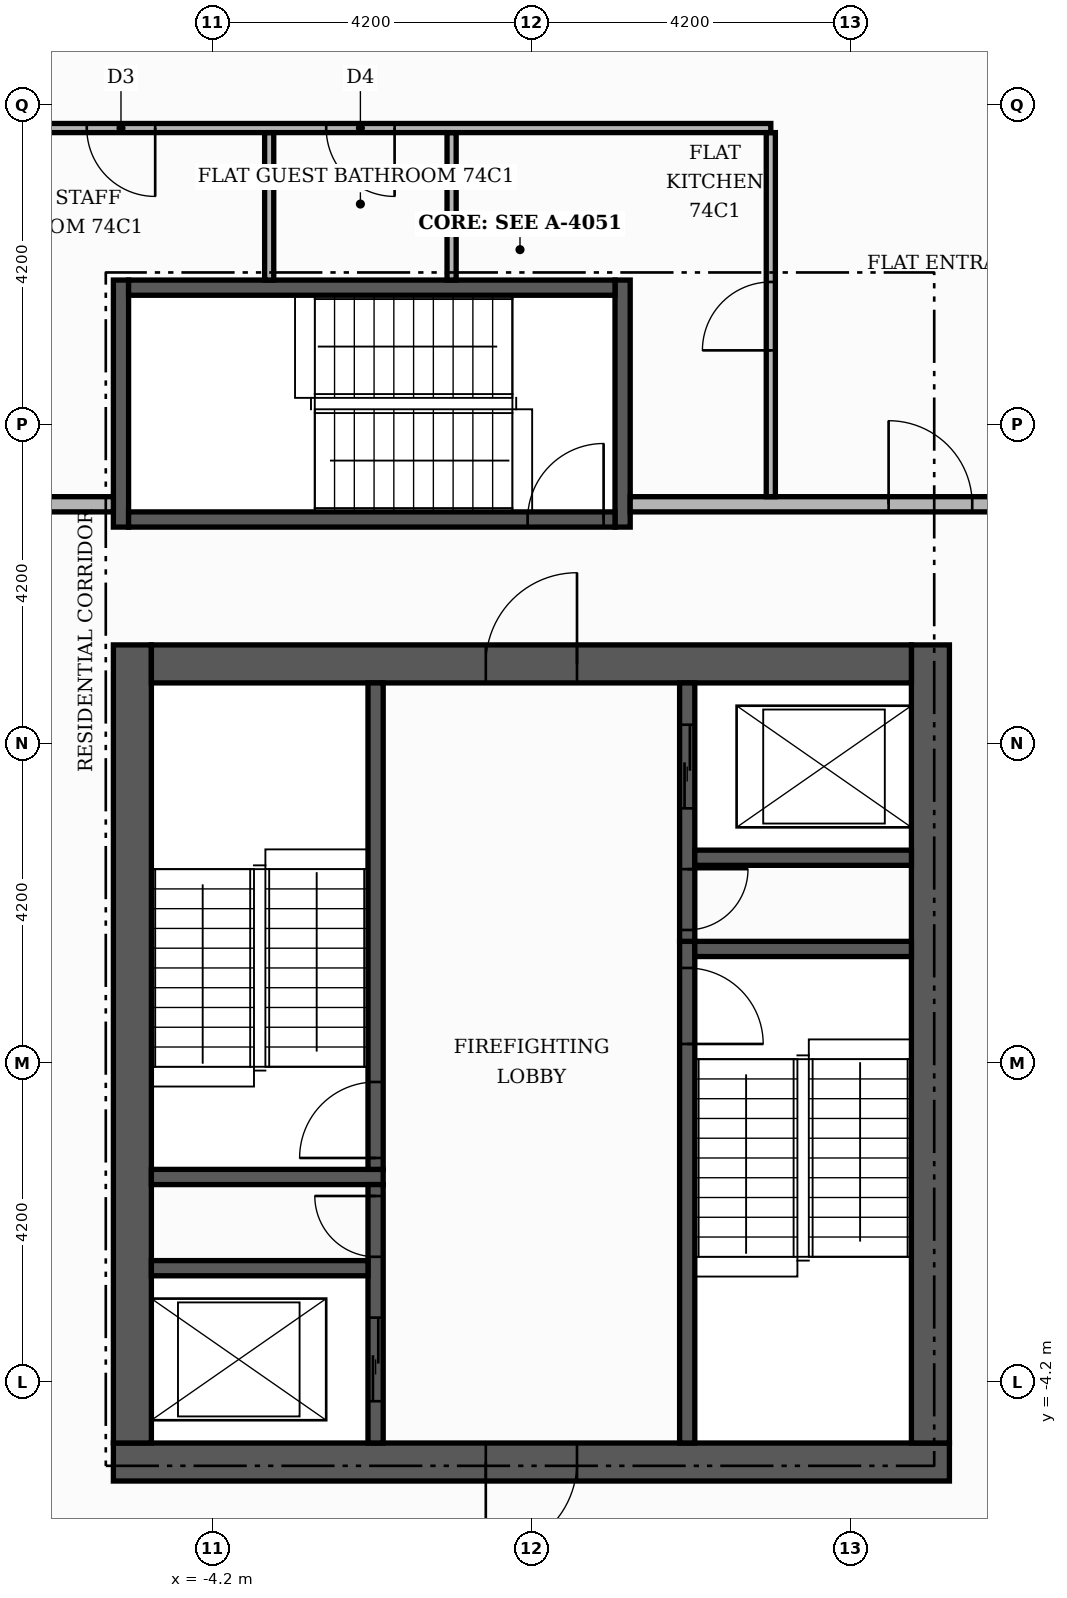
"""IFC4 building model, lengths in metres.
Left out: names, types, materials, properties, quantities, classifications, styles, units other than length and angle.
Written with IfcOpenShell. Run it as: python <this file> out.ifc"""

import sys

from ifc_helpers import new_model, si_unit, direction, frame, frame_2d, origin, place, context, subcontext, project, spatial, rectangle, extrude, element, fill, save


model = new_model("IFC4")
c1 = context("Model", 3, precision=1e-05, world=origin(), true_north=direction((0.0, 1.0)))
c2 = subcontext(c1, "Body", "Model", "MODEL_VIEW")
j1 = project(units=[si_unit("LENGTHUNIT", "METRE"), si_unit("PLANEANGLEUNIT", "RADIAN")], contexts=[c1])
p1 = place(None, origin())
s1 = spatial("IfcSite", under=j1, at=p1, CompositionType="ELEMENT")
p2 = place(p1, origin())
s2 = spatial("IfcBuilding", under=s1, at=p2, CompositionType="ELEMENT")
p3 = place(p2, frame((0.0, 0.0, 308.4)))
s3 = spatial("IfcBuildingStorey", under=s2, at=p3, CompositionType="ELEMENT", Elevation=308.4)
p4 = place(p3, frame((-5.5, -5.25, 0.0), z_axis=(0.0, 0.0, 1.0), x_axis=(1.0, 0.0, 0.0)))
e1 = element("IfcWall", 1, at=p4, inside=s3, PredefinedType="SHEAR", context=c2, shape_type="SweptSolid", body=[
    extrude(rectangle(XDim=11.0, YDim=0.5, at=frame_2d((5.5, 0.0))), origin(), (0.0, 0.0, 1.0), 3.55),
])
p5 = place(p4, frame((4.9, 0.0, 0.0)))
e2 = element("IfcOpeningElement", 2, at=p5, cuts=e1, PredefinedType="OPENING", context=c2, shape_type="SweptSolid", body=[
    extrude(rectangle(XDim=1.2, YDim=2.1, at=frame_2d((0.6, 1.05))), frame((0.0, 0.26, 0.0), z_axis=(0.0, -1.0, 0.0), x_axis=(1.0, 0.0, 0.0)), (0.0, 0.0, 1.0), 0.52),
])
for number, where, z_axis, x_axis in (
    (3, (-5.25, -5.0, 0.0), (0.0, 0.0, 1.0), (0.0, 1.0, 0.0)),
    (4, (5.25, -5.0, 0.0), (0.0, 0.0, 1.0), (0.0, 1.0, 0.0)),
):
    element("IfcWall", number, at=place(p3, frame(where, z_axis=z_axis, x_axis=x_axis)), inside=s3, PredefinedType="SHEAR", context=c2, shape_type="SweptSolid", body=[
        extrude(rectangle(XDim=10.5, YDim=0.5, at=frame_2d((5.25, 0.0))), origin(), (0.0, 0.0, 1.0), 3.55),
    ])
p6 = place(p3, frame((-5.0, 5.25, 0.0), z_axis=(0.0, 0.0, 1.0), x_axis=(1.0, 0.0, 0.0)))
e5 = element("IfcWall", 5, at=p6, inside=s3, PredefinedType="SHEAR", context=c2, shape_type="SweptSolid", body=[
    extrude(rectangle(XDim=10.0, YDim=0.5, at=frame_2d((5.0, 0.0))), origin(), (0.0, 0.0, 1.0), 3.55),
])
p7 = place(p6, frame((4.4, 0.0, 0.0)))
e6 = element("IfcOpeningElement", 6, at=p7, cuts=e5, PredefinedType="OPENING", context=c2, shape_type="SweptSolid", body=[
    extrude(rectangle(XDim=1.2, YDim=2.1, at=frame_2d((0.6, 1.05))), frame((0.0, 0.26, 0.0), z_axis=(0.0, -1.0, 0.0), x_axis=(1.0, 0.0, 0.0)), (0.0, 0.0, 1.0), 0.52),
])
p8 = place(p3, frame((2.05, -5.0, 0.0), z_axis=(0.0, 0.0, 1.0), x_axis=(0.0, 1.0, 0.0)))
e7 = element("IfcWall", 7, at=p8, inside=s3, PredefinedType="SHEAR", context=c2, shape_type="SweptSolid", body=[
    extrude(rectangle(XDim=6.6, YDim=0.2, at=frame_2d((3.3, 0.0))), origin(), (0.0, 0.0, 1.0), 3.55),
])
p9 = place(p8, frame((5.25, 0.0, 0.0)))
e8 = element("IfcOpeningElement", 8, at=p9, cuts=e7, PredefinedType="OPENING", context=c2, shape_type="SweptSolid", body=[
    extrude(rectangle(XDim=1.0, YDim=2.1, at=frame_2d((0.5, 1.05))), frame((0.0, 0.11, 0.0), z_axis=(0.0, -1.0, 0.0), x_axis=(1.0, 0.0, 0.0)), (0.0, 0.0, 1.0), 0.22),
])
p10 = place(p3, frame((-5.0, -1.5, 0.0), z_axis=(0.0, 0.0, 1.0), x_axis=(1.0, 0.0, 0.0)))
e9 = element("IfcWall", 9, at=p10, inside=s3, PredefinedType="SHEAR", context=c2, shape_type="SweptSolid", body=[
    extrude(rectangle(XDim=3.05, YDim=0.2, at=frame_2d((1.525, 0.0))), origin(), (0.0, 0.0, 1.0), 3.55),
])
p11 = place(p3, frame((-2.05, -1.4, 0.0), z_axis=(0.0, 0.0, 1.0), x_axis=(0.0, 1.0, 0.0)))
e10 = element("IfcWall", 10, at=p11, inside=s3, PredefinedType="SHEAR", context=c2, shape_type="SweptSolid", body=[
    extrude(rectangle(XDim=6.4, YDim=0.2, at=frame_2d((3.2, 0.0))), origin(), (0.0, 0.0, 1.0), 3.55),
])
p12 = place(p11, frame((0.15, 0.0, 0.0)))
e11 = element("IfcOpeningElement", 11, at=p12, cuts=e10, PredefinedType="OPENING", context=c2, shape_type="SweptSolid", body=[
    extrude(rectangle(XDim=1.0, YDim=2.1, at=frame_2d((0.5, 1.05))), frame((0.0, 0.11, 0.0), z_axis=(0.0, -1.0, 0.0), x_axis=(1.0, 0.0, 0.0)), (0.0, 0.0, 1.0), 0.22),
])
p13 = place(p3, frame((2.15, 1.5, 0.0), z_axis=(0.0, 0.0, 1.0), x_axis=(1.0, 0.0, 0.0)))
e12 = element("IfcWall", 12, at=p13, inside=s3, PredefinedType="SHEAR", context=c2, shape_type="SweptSolid", body=[
    extrude(rectangle(XDim=2.85, YDim=0.2, at=frame_2d((1.425, 0.0))), origin(), (0.0, 0.0, 1.0), 3.55),
])
p14 = place(p3, frame((-2.05, -5.0, 0.0), z_axis=(0.0, 0.0, 1.0), x_axis=(0.0, 1.0, 0.0)))
e13 = element("IfcWall", 13, at=p14, inside=s3, PredefinedType="SHEAR", context=c2, shape_type="SweptSolid", body=[
    extrude(rectangle(XDim=3.4, YDim=0.2, at=frame_2d((1.7, 0.0))), origin(), (0.0, 0.0, 1.0), 3.55),
])
p15 = place(p14, frame((0.55, 0.0, 0.0)))
e14 = element("IfcOpeningElement", 14, at=p15, cuts=e13, PredefinedType="OPENING", context=c2, shape_type="SweptSolid", body=[
    extrude(rectangle(XDim=1.1, YDim=2.1, at=frame_2d((0.55, 1.05))), frame((0.0, 0.11, 0.0), z_axis=(0.0, -1.0, 0.0), x_axis=(1.0, 0.0, 0.0)), (0.0, 0.0, 1.0), 0.22),
])
p16 = place(p14, frame((2.45, 0.0, 0.0)))
e15 = element("IfcOpeningElement", 15, at=p16, cuts=e13, PredefinedType="OPENING", context=c2, shape_type="SweptSolid", body=[
    extrude(rectangle(XDim=0.8, YDim=2.1, at=frame_2d((0.4, 1.05))), frame((0.0, 0.11, 0.0), z_axis=(0.0, -1.0, 0.0), x_axis=(1.0, 0.0, 0.0)), (0.0, 0.0, 1.0), 0.22),
])
p17 = place(p3, frame((-5.0, -2.7, 0.0), z_axis=(0.0, 0.0, 1.0), x_axis=(1.0, 0.0, 0.0)))
e16 = element("IfcWall", 16, at=p17, inside=s3, PredefinedType="SHEAR", context=c2, shape_type="SweptSolid", body=[
    extrude(rectangle(XDim=2.85, YDim=0.2, at=frame_2d((1.425, 0.0))), origin(), (0.0, 0.0, 1.0), 3.55),
])
p18 = place(p3, frame((2.05, 1.6, 0.0), z_axis=(0.0, 0.0, 1.0), x_axis=(0.0, 1.0, 0.0)))
e17 = element("IfcWall", 17, at=p18, inside=s3, PredefinedType="SHEAR", context=c2, shape_type="SweptSolid", body=[
    extrude(rectangle(XDim=3.4, YDim=0.2, at=frame_2d((1.7, 0.0))), origin(), (0.0, 0.0, 1.0), 3.55),
])
p19 = place(p18, frame((1.75, 0.0, 0.0)))
e18 = element("IfcOpeningElement", 18, at=p19, cuts=e17, PredefinedType="OPENING", context=c2, shape_type="SweptSolid", body=[
    extrude(rectangle(XDim=1.1, YDim=2.1, at=frame_2d((0.55, 1.05))), frame((0.0, 0.11, 0.0), z_axis=(0.0, -1.0, 0.0), x_axis=(1.0, 0.0, 0.0)), (0.0, 0.0, 1.0), 0.22),
])
p20 = place(p18, frame((0.15, 0.0, 0.0)))
e19 = element("IfcOpeningElement", 19, at=p20, cuts=e17, PredefinedType="OPENING", context=c2, shape_type="SweptSolid", body=[
    extrude(rectangle(XDim=0.8, YDim=2.1, at=frame_2d((0.4, 1.05))), frame((0.0, 0.11, 0.0), z_axis=(0.0, -1.0, 0.0), x_axis=(1.0, 0.0, 0.0)), (0.0, 0.0, 1.0), 0.22),
])
p21 = place(p3, frame((2.15, 2.7, 0.0), z_axis=(0.0, 0.0, 1.0), x_axis=(1.0, 0.0, 0.0)))
e20 = element("IfcWall", 20, at=p21, inside=s3, PredefinedType="SHEAR", context=c2, shape_type="SweptSolid", body=[
    extrude(rectangle(XDim=2.85, YDim=0.2, at=frame_2d((1.425, 0.0))), origin(), (0.0, 0.0, 1.0), 3.55),
])
for number, where, z_axis, x_axis in (
    (21, (-5.4, 7.05, 0.0), (0.0, 0.0, 1.0), (0.0, 1.0, 0.0)),
    (22, (1.2, 7.05, 0.0), (0.0, 0.0, 1.0), (0.0, 1.0, 0.0)),
):
    element("IfcWall", number, at=place(p3, frame(where, z_axis=z_axis, x_axis=x_axis)), inside=s3, PredefinedType="SHEAR", context=c2, shape_type="SweptSolid", body=[
        extrude(rectangle(XDim=3.25, YDim=0.2, at=frame_2d((1.625, 0.0))), origin(), (0.0, 0.0, 1.0), 3.55),
    ])
p22 = place(p3, frame((-5.3, 7.15, 0.0), z_axis=(0.0, 0.0, 1.0), x_axis=(1.0, 0.0, 0.0)))
e23 = element("IfcWall", 23, at=p22, inside=s3, PredefinedType="SHEAR", context=c2, shape_type="SweptSolid", body=[
    extrude(rectangle(XDim=6.4, YDim=0.2, at=frame_2d((3.2, 0.0))), origin(), (0.0, 0.0, 1.0), 3.55),
])
p23 = place(p22, frame((5.25, 0.0, 0.0)))
e24 = element("IfcOpeningElement", 24, at=p23, cuts=e23, PredefinedType="OPENING", context=c2, shape_type="SweptSolid", body=[
    extrude(rectangle(XDim=1.0, YDim=2.1, at=frame_2d((0.5, 1.05))), frame((0.0, 0.11, 0.0), z_axis=(0.0, -1.0, 0.0), x_axis=(1.0, 0.0, 0.0)), (0.0, 0.0, 1.0), 0.22),
])
p24 = place(p3, frame((-5.3, 10.2, 0.0), z_axis=(0.0, 0.0, 1.0), x_axis=(1.0, 0.0, 0.0)))
e25 = element("IfcWall", 25, at=p24, inside=s3, PredefinedType="SHEAR", context=c2, shape_type="SweptSolid", body=[
    extrude(rectangle(XDim=6.4, YDim=0.2, at=frame_2d((3.2, 0.0))), origin(), (0.0, 0.0, 1.0), 3.55),
])
p25 = place(p3, frame((-7.35, 7.35, 0.0), z_axis=(0.0, 0.0, 1.0), x_axis=(1.0, 0.0, 0.0)))
e26 = element("IfcWall", 26, at=p25, inside=s3, PredefinedType="PARTITIONING", context=c2, shape_type="SweptSolid", body=[
    extrude(rectangle(XDim=1.85, YDim=0.2, at=frame_2d((0.925, 0.0))), origin(), (0.0, 0.0, 1.0), 3.55),
])
p26 = place(p3, frame((1.3, 7.35, 0.0), z_axis=(0.0, 0.0, 1.0), x_axis=(1.0, 0.0, 0.0)))
e27 = element("IfcWall", 27, at=p26, inside=s3, PredefinedType="PARTITIONING", context=c2, shape_type="SweptSolid", body=[
    extrude(rectangle(XDim=17.2, YDim=0.2, at=frame_2d((8.6, 0.0))), origin(), (0.0, 0.0, 1.0), 3.55),
])
p27 = place(p26, frame((3.4, 0.0, 0.0)))
e28 = element("IfcOpeningElement", 28, at=p27, cuts=e27, PredefinedType="OPENING", context=c2, shape_type="SweptSolid", body=[
    extrude(rectangle(XDim=1.1, YDim=2.4, at=frame_2d((0.55, 1.2))), frame((0.0, 0.11, 0.0), z_axis=(0.0, -1.0, 0.0), x_axis=(1.0, 0.0, 0.0)), (0.0, 0.0, 1.0), 0.22),
])
p28 = place(p3, frame((3.15, 7.45, 0.0), z_axis=(0.0, 0.0, 1.0), x_axis=(0.0, 1.0, 0.0)))
e29 = element("IfcWall", 29, at=p28, inside=s3, PredefinedType="PARTITIONING", context=c2, shape_type="SweptSolid", body=[
    extrude(rectangle(XDim=4.79, YDim=0.12, at=frame_2d((2.395, 0.0))), origin(), (0.0, 0.0, 1.0), 3.55),
])
p29 = place(p28, frame((1.925, 0.0, 0.0)))
e30 = element("IfcOpeningElement", 30, at=p29, cuts=e29, PredefinedType="OPENING", context=c2, shape_type="SweptSolid", body=[
    extrude(rectangle(XDim=0.9, YDim=2.1, at=frame_2d((0.45, 1.05))), frame((0.0, 0.07, 0.0), z_axis=(0.0, -1.0, 0.0), x_axis=(1.0, 0.0, 0.0)), (0.0, 0.0, 1.0), 0.14),
])
for number, where, z_axis, x_axis in (
    (31, (-3.45, 10.3, 0.0), (0.0, 0.0, 1.0), (0.0, 1.0, 0.0)),
    (32, (-1.05, 10.3, 0.0), (0.0, 0.0, 1.0), (0.0, 1.0, 0.0)),
):
    element("IfcWall", number, at=place(p3, frame(where, z_axis=z_axis, x_axis=x_axis)), inside=s3, PredefinedType="PARTITIONING", context=c2, shape_type="SweptSolid", body=[
        extrude(rectangle(XDim=1.94, YDim=0.12, at=frame_2d((0.97, 0.0))), origin(), (0.0, 0.0, 1.0), 3.55),
    ])
p30 = place(p3, frame((-7.25, 12.3, 0.0), z_axis=(0.0, 0.0, 1.0), x_axis=(1.0, 0.0, 0.0)))
e33 = element("IfcWall", 33, at=p30, inside=s3, PredefinedType="PARTITIONING", context=c2, shape_type="SweptSolid", body=[
    extrude(rectangle(XDim=10.4, YDim=0.12, at=frame_2d((5.2, 0.0))), origin(), (0.0, 0.0, 1.0), 3.55),
])
p31 = place(p30, frame((4.55, 0.0, 0.0)))
e34 = element("IfcOpeningElement", 34, at=p31, cuts=e33, PredefinedType="OPENING", context=c2, shape_type="SweptSolid", body=[
    extrude(rectangle(XDim=0.9, YDim=2.1, at=frame_2d((0.45, 1.05))), frame((0.0, 0.07, 0.0), z_axis=(0.0, -1.0, 0.0), x_axis=(1.0, 0.0, 0.0)), (0.0, 0.0, 1.0), 0.14),
])
p32 = place(p30, frame((1.4, 0.0, 0.0)))
e35 = element("IfcOpeningElement", 35, at=p32, cuts=e33, PredefinedType="OPENING", context=c2, shape_type="SweptSolid", body=[
    extrude(rectangle(XDim=0.9, YDim=2.1, at=frame_2d((0.45, 1.05))), frame((0.0, 0.07, 0.0), z_axis=(0.0, -1.0, 0.0), x_axis=(1.0, 0.0, 0.0)), (0.0, 0.0, 1.0), 0.14),
])
p33 = place(p19, origin())
e36 = element("IfcDoor", 36, at=p33, inside=s3, OperationType="SLIDING_TO_LEFT", PredefinedType="DOOR", context=c2, shape_type="SweptSolid", body=[
    extrude(rectangle(XDim=1.1, YDim=2.1, at=frame_2d((0.55, 1.05))), frame((0.0, 0.025, 0.0), z_axis=(0.0, -1.0, 0.0), x_axis=(1.0, 0.0, 0.0)), (0.0, 0.0, 1.0), 0.05),
])
fill(e18, e36)
p34 = place(p15, origin())
e37 = element("IfcDoor", 37, at=p34, inside=s3, OperationType="SLIDING_TO_LEFT", PredefinedType="DOOR", context=c2, shape_type="SweptSolid", body=[
    extrude(rectangle(XDim=1.1, YDim=2.1, at=frame_2d((0.55, 1.05))), frame((0.0, 0.025, 0.0), z_axis=(0.0, -1.0, 0.0), x_axis=(1.0, 0.0, 0.0)), (0.0, 0.0, 1.0), 0.05),
])
fill(e14, e37)
p35 = place(p12, origin())
e38 = element("IfcDoor", 38, at=p35, inside=s3, OperationType="SINGLE_SWING_LEFT", PredefinedType="DOOR", context=c2, shape_type="SweptSolid", body=[
    extrude(rectangle(XDim=1.0, YDim=2.1, at=frame_2d((0.5, 1.05))), frame((0.0, 0.025, 0.0), z_axis=(0.0, -1.0, 0.0), x_axis=(1.0, 0.0, 0.0)), (0.0, 0.0, 1.0), 0.05),
])
fill(e11, e38)
p36 = place(p9, frame((1.0, 0.0, 0.0), z_axis=(0.0, 0.0, 1.0), x_axis=(-1.0, 0.0, 0.0)))
e39 = element("IfcDoor", 39, at=p36, inside=s3, OperationType="SINGLE_SWING_LEFT", PredefinedType="DOOR", context=c2, shape_type="SweptSolid", body=[
    extrude(rectangle(XDim=1.0, YDim=2.1, at=frame_2d((0.5, 1.05))), frame((0.0, 0.025, 0.0), z_axis=(0.0, -1.0, 0.0), x_axis=(1.0, 0.0, 0.0)), (0.0, 0.0, 1.0), 0.05),
])
fill(e8, e39)
p37 = place(p20, frame((0.8, 0.0, 0.0), z_axis=(0.0, 0.0, 1.0), x_axis=(-1.0, 0.0, 0.0)))
e40 = element("IfcDoor", 40, at=p37, inside=s3, OperationType="SINGLE_SWING_RIGHT", PredefinedType="DOOR", context=c2, shape_type="SweptSolid", body=[
    extrude(rectangle(XDim=0.8, YDim=2.1, at=frame_2d((0.4, 1.05))), frame((0.0, 0.025, 0.0), z_axis=(0.0, -1.0, 0.0), x_axis=(1.0, 0.0, 0.0)), (0.0, 0.0, 1.0), 0.05),
])
fill(e19, e40)
p38 = place(p16, origin())
e41 = element("IfcDoor", 41, at=p38, inside=s3, OperationType="SINGLE_SWING_RIGHT", PredefinedType="DOOR", context=c2, shape_type="SweptSolid", body=[
    extrude(rectangle(XDim=0.8, YDim=2.1, at=frame_2d((0.4, 1.05))), frame((0.0, 0.025, 0.0), z_axis=(0.0, -1.0, 0.0), x_axis=(1.0, 0.0, 0.0)), (0.0, 0.0, 1.0), 0.05),
])
fill(e15, e41)
p39 = place(p23, origin())
e42 = element("IfcDoor", 42, at=p39, inside=s3, OperationType="SINGLE_SWING_RIGHT", PredefinedType="DOOR", context=c2, shape_type="SweptSolid", body=[
    extrude(rectangle(XDim=1.0, YDim=2.1, at=frame_2d((0.5, 1.05))), frame((0.0, 0.025, 0.0), z_axis=(0.0, -1.0, 0.0), x_axis=(1.0, 0.0, 0.0)), (0.0, 0.0, 1.0), 0.05),
])
fill(e24, e42)
p40 = place(p7, origin())
e43 = element("IfcDoor", 43, at=p40, inside=s3, OperationType="SINGLE_SWING_RIGHT", PredefinedType="DOOR", context=c2, shape_type="SweptSolid", body=[
    extrude(rectangle(XDim=1.2, YDim=2.1, at=frame_2d((0.6, 1.05))), frame((0.0, 0.025, 0.0), z_axis=(0.0, -1.0, 0.0), x_axis=(1.0, 0.0, 0.0)), (0.0, 0.0, 1.0), 0.05),
])
fill(e6, e43)
p41 = place(p5, frame((1.2, 0.0, 0.0), z_axis=(0.0, 0.0, 1.0), x_axis=(-1.0, 0.0, 0.0)))
e44 = element("IfcDoor", 44, at=p41, inside=s3, OperationType="SINGLE_SWING_LEFT", PredefinedType="DOOR", context=c2, shape_type="SweptSolid", body=[
    extrude(rectangle(XDim=1.2, YDim=2.1, at=frame_2d((0.6, 1.05))), frame((0.0, 0.025, 0.0), z_axis=(0.0, -1.0, 0.0), x_axis=(1.0, 0.0, 0.0)), (0.0, 0.0, 1.0), 0.05),
])
fill(e2, e44)
p42 = place(p27, origin())
e45 = element("IfcDoor", 45, at=p42, inside=s3, OperationType="SINGLE_SWING_LEFT", PredefinedType="DOOR", context=c2, shape_type="SweptSolid", body=[
    extrude(rectangle(XDim=1.1, YDim=2.4, at=frame_2d((0.55, 1.2))), frame((0.0, 0.025, 0.0), z_axis=(0.0, -1.0, 0.0), x_axis=(1.0, 0.0, 0.0)), (0.0, 0.0, 1.0), 0.05),
])
fill(e28, e45)
p43 = place(p29, origin())
e46 = element("IfcDoor", 46, at=p43, inside=s3, OperationType="SINGLE_SWING_LEFT", PredefinedType="DOOR", context=c2, shape_type="SweptSolid", body=[
    extrude(rectangle(XDim=0.9, YDim=2.1, at=frame_2d((0.45, 1.05))), frame((0.0, 0.025, 0.0), z_axis=(0.0, -1.0, 0.0), x_axis=(1.0, 0.0, 0.0)), (0.0, 0.0, 1.0), 0.05),
])
fill(e30, e46)
p44 = place(p31, frame((0.9, 0.0, 0.0), z_axis=(0.0, 0.0, 1.0), x_axis=(-1.0, 0.0, 0.0)))
e47 = element("IfcDoor", 47, at=p44, inside=s3, OperationType="SINGLE_SWING_RIGHT", PredefinedType="DOOR", context=c2, shape_type="SweptSolid", body=[
    extrude(rectangle(XDim=0.9, YDim=2.1, at=frame_2d((0.45, 1.05))), frame((0.0, 0.025, 0.0), z_axis=(0.0, -1.0, 0.0), x_axis=(1.0, 0.0, 0.0)), (0.0, 0.0, 1.0), 0.05),
])
fill(e34, e47)
p45 = place(p32, frame((0.9, 0.0, 0.0), z_axis=(0.0, 0.0, 1.0), x_axis=(-1.0, 0.0, 0.0)))
e48 = element("IfcDoor", 48, at=p45, inside=s3, OperationType="SINGLE_SWING_RIGHT", PredefinedType="DOOR", context=c2, shape_type="SweptSolid", body=[
    extrude(rectangle(XDim=0.9, YDim=2.1, at=frame_2d((0.45, 1.05))), frame((0.0, 0.025, 0.0), z_axis=(0.0, -1.0, 0.0), x_axis=(1.0, 0.0, 0.0)), (0.0, 0.0, 1.0), 0.05),
])
fill(e35, e48)
save(model, sys.argv[1])
